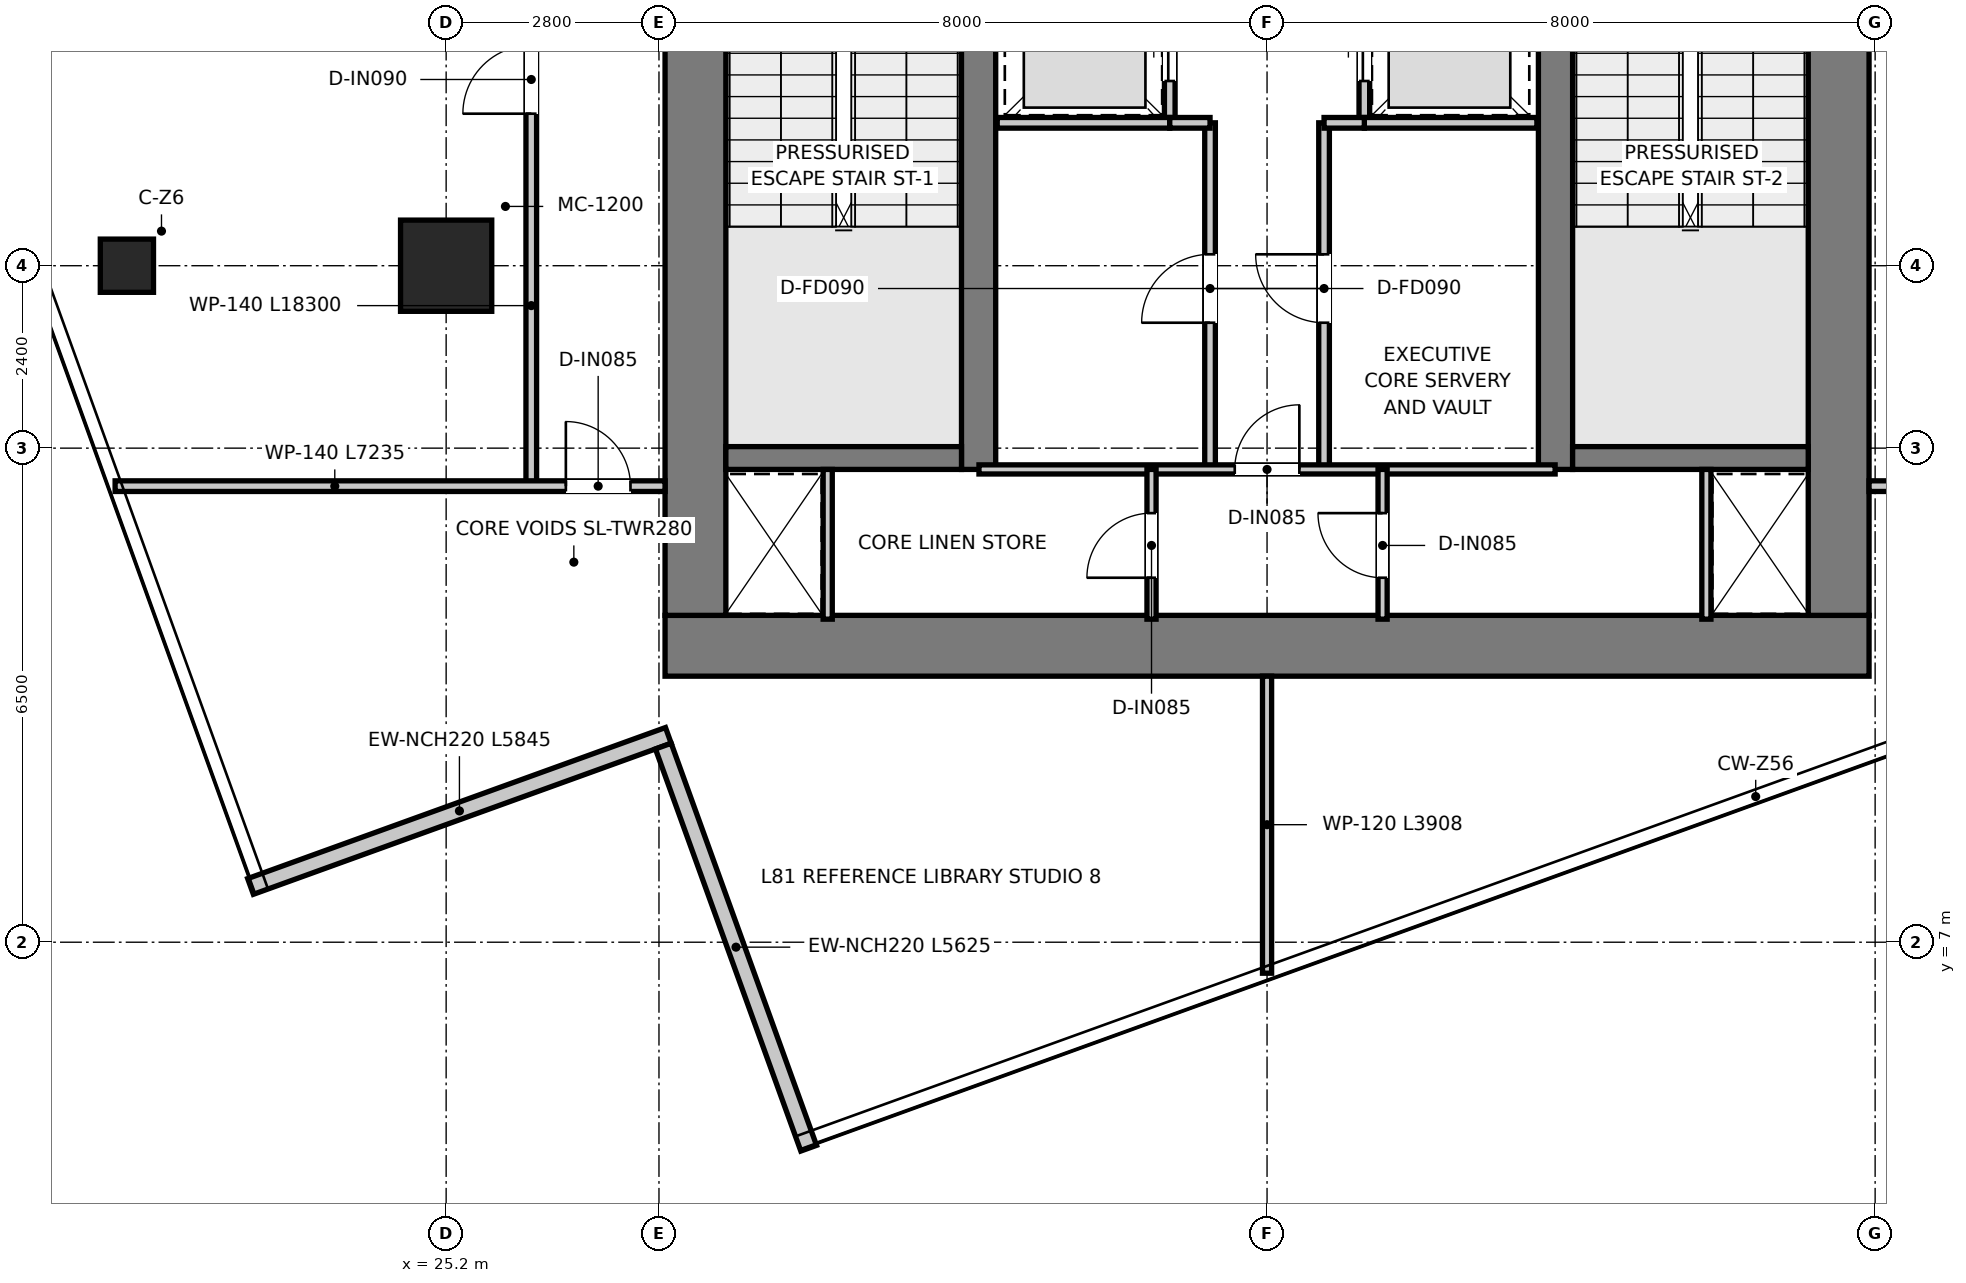
"""IFC4 building model, lengths in metres.
Left out: names, types, materials, properties, quantities, classifications, styles, units other than length and angle.
Written with IfcOpenShell. Run it as: python <this file> out.ifc"""

import sys

from ifc_helpers import new_model, si_unit, direction, frame, frame_2d, origin, origin_2d, place, context, subcontext, project, spatial, rectangle, extrude, source, transform, mapped, element, fill, save


model = new_model("IFC4")
c1 = context("Model", 3, precision=1e-05, world=origin(), true_north=direction((0.0, 1.0)))
c2 = subcontext(c1, "Body", "Model", "MODEL_VIEW")
j1 = project(units=[si_unit("LENGTHUNIT", "METRE"), si_unit("PLANEANGLEUNIT", "RADIAN")], contexts=[c1])
p1 = place(None, origin())
s1 = spatial("IfcSite", under=j1, at=p1, CompositionType="ELEMENT")
p2 = place(p1, origin())
s2 = spatial("IfcBuilding", under=s1, at=p2, CompositionType="ELEMENT")
p3 = place(p2, frame((0.0, 0.0, 331.65)))
s3 = spatial("IfcBuildingStorey", under=s2, at=p3, CompositionType="ELEMENT", Elevation=331.65)
p4 = place(p3, frame((28.08, 10.9, 0.0), z_axis=(0.0, 0.0, 1.0), x_axis=(1.0, 0.0, 0.0)))
e1 = element("IfcWall", 1, at=p4, inside=s3, PredefinedType="SHEAR", context=c2, shape_type="SweptSolid", body=[
    extrude(rectangle(XDim=15.84, YDim=0.8, at=frame_2d((7.92, 0.0))), origin(), (0.0, 0.0, 1.0), 3.95),
])
for number, where, z_axis, x_axis in (
    (2, (28.48, 11.3, 0.0), (0.0, 0.0, 1.0), (0.0, 1.0, 0.0)),
    (3, (43.52, 11.3, 0.0), (0.0, 0.0, 1.0), (0.0, 1.0, 0.0)),
):
    element("IfcWall", number, at=place(p3, frame(where, z_axis=z_axis, x_axis=x_axis)), inside=s3, PredefinedType="SHEAR", context=c2, shape_type="SweptSolid", body=[
        extrude(rectangle(XDim=14.7, YDim=0.8, at=frame_2d((7.35, 0.0))), origin(), (0.0, 0.0, 1.0), 3.95),
    ])
p5 = place(p3, frame((32.205, 13.22, 0.0), z_axis=(0.0, 0.0, 1.0), x_axis=(0.0, 1.0, 0.0)))
e4 = element("IfcWall", 4, at=p5, inside=s3, PredefinedType="SHEAR", context=c2, shape_type="SweptSolid", body=[
    extrude(rectangle(XDim=12.78, YDim=0.45, at=frame_2d((6.39, 0.0))), origin(), (0.0, 0.0, 1.0), 3.95),
])
p6 = place(p5, frame((10.58, 0.0, 0.0)))
e5 = element("IfcOpeningElement", 5, at=p6, cuts=e4, PredefinedType="OPENING", context=c2, shape_type="SweptSolid", body=[
    extrude(rectangle(XDim=1.1, YDim=2.15, at=frame_2d((0.55, 1.075))), frame((0.0, 0.235, 0.0), z_axis=(0.0, -1.0, 0.0), x_axis=(1.0, 0.0, 0.0)), (0.0, 0.0, 1.0), 0.47),
])
p7 = place(p3, frame((39.795, 13.22, 0.0), z_axis=(0.0, 0.0, 1.0), x_axis=(0.0, 1.0, 0.0)))
e6 = element("IfcWall", 6, at=p7, inside=s3, PredefinedType="SHEAR", context=c2, shape_type="SweptSolid", body=[
    extrude(rectangle(XDim=12.78, YDim=0.45, at=frame_2d((6.39, 0.0))), origin(), (0.0, 0.0, 1.0), 3.95),
])
p8 = place(p7, frame((10.58, 0.0, 0.0)))
e7 = element("IfcOpeningElement", 7, at=p8, cuts=e6, PredefinedType="OPENING", context=c2, shape_type="SweptSolid", body=[
    extrude(rectangle(XDim=1.1, YDim=2.15, at=frame_2d((0.55, 1.075))), frame((0.0, 0.235, 0.0), z_axis=(0.0, -1.0, 0.0), x_axis=(1.0, 0.0, 0.0)), (0.0, 0.0, 1.0), 0.47),
])
for number, where, z_axis, x_axis in (
    (8, (28.88, 13.37, 0.0), (0.0, 0.0, 1.0), (1.0, 0.0, 0.0)),
    (9, (40.02, 13.37, 0.0), (0.0, 0.0, 1.0), (1.0, 0.0, 0.0)),
):
    element("IfcWall", number, at=place(p3, frame(where, z_axis=z_axis, x_axis=x_axis)), inside=s3, PredefinedType="SHEAR", context=c2, shape_type="SweptSolid", body=[
        extrude(rectangle(XDim=3.1, YDim=0.3, at=frame_2d((1.55, 0.0))), origin(), (0.0, 0.0, 1.0), 3.95),
    ])
m1 = source(origin(), c2, "Body", "SweptSolid", [
    extrude(rectangle(XDim=1.2, YDim=1.2, at=origin_2d()), origin(), (0.0, 0.0, 1.0), 3.95),
])
p9 = place(p3, frame((25.2, 15.9, 0.0), z_axis=(0.0, 0.0, 1.0), x_axis=(1.0, 0.0, 0.0)))
e10 = element("IfcColumn", 10, at=p9, inside=s3, PredefinedType="USERDEFINED", context=c2, shape_type="MappedRepresentation", body=[
    mapped(m1, transform((0.0, 0.0, 0.0), x_axis=(1.0, 0.0, 0.0), y_axis=(0.0, 1.0, 0.0), z_axis=(0.0, 0.0, 1.0), scale=1.0)),
])
m2 = source(origin(), c2, "Body", "SweptSolid", [
    extrude(rectangle(XDim=0.7, YDim=0.7, at=origin_2d()), origin(), (0.0, 0.0, 1.0), 3.95),
])
p10 = place(p3, frame((21.0, 15.9, 0.0), z_axis=(0.0, 0.0, 1.0), x_axis=(1.0, 0.0, 0.0)))
e11 = element("IfcColumn", 11, at=p10, inside=s3, PredefinedType="COLUMN", context=c2, shape_type="MappedRepresentation", body=[
    mapped(m2, transform((0.0, 0.0, 0.0), x_axis=(1.0, 0.0, 0.0), y_axis=(0.0, 1.0, 0.0), z_axis=(0.0, 0.0, 1.0), scale=1.0)),
])
p11 = place(p3, frame((22.626, 7.734, 0.0), z_axis=(0.0, 0.0, 1.0), x_axis=(0.940439315222, 0.339961607222, 0.0)))
e12 = element("IfcWall", 12, at=p11, inside=s3, PredefinedType="ELEMENTEDWALL", context=c2, shape_type="SweptSolid", body=[
    extrude(rectangle(XDim=5.845, YDim=0.22, at=frame_2d((2.922, 0.0))), origin(), (0.0, 0.0, 1.0), 3.67),
])
p12 = place(p3, frame((28.057, 9.58, 0.0), z_axis=(0.0, 0.0, 1.0), x_axis=(0.339968670636, -0.940436761822, 0.0)))
e13 = element("IfcWall", 13, at=p12, inside=s3, PredefinedType="ELEMENTEDWALL", context=c2, shape_type="SweptSolid", body=[
    extrude(rectangle(XDim=5.625, YDim=0.22, at=frame_2d((2.812, 0.0))), origin(), (0.0, 0.0, 1.0), 3.67),
])
p13 = place(p3, frame((34.72, 17.78, 0.0), z_axis=(0.0, 0.0, 1.0), x_axis=(0.0, 1.0, 0.0)))
e14 = element("IfcWall", 14, at=p13, inside=s3, PredefinedType="PARTITIONING", context=c2, shape_type="SweptSolid", body=[
    extrude(rectangle(XDim=2.42, YDim=0.14, at=frame_2d((1.21, 0.0))), origin(), (0.0, 0.0, 1.0), 3.67),
])
p14 = place(p13, frame((0.55, 0.0, 0.0)))
e15 = element("IfcOpeningElement", 15, at=p14, cuts=e14, PredefinedType="OPENING", context=c2, shape_type="SweptSolid", body=[
    extrude(rectangle(XDim=1.1, YDim=2.15, at=frame_2d((0.55, 1.075))), frame((0.0, 0.08, 0.0), z_axis=(0.0, -1.0, 0.0), x_axis=(1.0, 0.0, 0.0)), (0.0, 0.0, 1.0), 0.16),
])
p15 = place(p3, frame((37.28, 17.78, 0.0), z_axis=(0.0, 0.0, 1.0), x_axis=(0.0, 1.0, 0.0)))
e16 = element("IfcWall", 16, at=p15, inside=s3, PredefinedType="PARTITIONING", context=c2, shape_type="SweptSolid", body=[
    extrude(rectangle(XDim=2.42, YDim=0.14, at=frame_2d((1.21, 0.0))), origin(), (0.0, 0.0, 1.0), 3.67),
])
p16 = place(p15, frame((0.55, 0.0, 0.0)))
e17 = element("IfcOpeningElement", 17, at=p16, cuts=e16, PredefinedType="OPENING", context=c2, shape_type="SweptSolid", body=[
    extrude(rectangle(XDim=1.1, YDim=2.15, at=frame_2d((0.55, 1.075))), frame((0.0, 0.08, 0.0), z_axis=(0.0, -1.0, 0.0), x_axis=(1.0, 0.0, 0.0)), (0.0, 0.0, 1.0), 0.16),
])
for number, where, z_axis, x_axis in (
    (18, (32.45, 17.78, 0.0), (0.0, 0.0, 1.0), (1.0, 0.0, 0.0)),
    (19, (37.28, 17.78, 0.0), (0.0, 0.0, 1.0), (1.0, 0.0, 0.0)),
):
    element("IfcWall", number, at=place(p3, frame(where, z_axis=z_axis, x_axis=x_axis)), inside=s3, PredefinedType="PARTITIONING", context=c2, shape_type="SweptSolid", body=[
        extrude(rectangle(XDim=2.27, YDim=0.14, at=frame_2d((1.135, 0.0))), origin(), (0.0, 0.0, 1.0), 3.67),
    ])
p17 = place(p3, frame((35.25, 13.22, 0.0), z_axis=(0.0, 0.0, 1.0), x_axis=(0.0, 1.0, 0.0)))
e20 = element("IfcWall", 20, at=p17, inside=s3, PredefinedType="PARTITIONING", context=c2, shape_type="SweptSolid", body=[
    extrude(rectangle(XDim=4.56, YDim=0.14, at=frame_2d((2.28, 0.0))), origin(), (0.0, 0.0, 1.0), 3.67),
])
p18 = place(p17, frame((1.93, 0.0, 0.0)))
e21 = element("IfcOpeningElement", 21, at=p18, cuts=e20, PredefinedType="OPENING", context=c2, shape_type="SweptSolid", body=[
    extrude(rectangle(XDim=0.9, YDim=2.1, at=frame_2d((0.45, 1.05))), frame((0.0, 0.08, 0.0), z_axis=(0.0, -1.0, 0.0), x_axis=(1.0, 0.0, 0.0)), (0.0, 0.0, 1.0), 0.16),
])
p19 = place(p3, frame((34.72, 17.78, 0.0), z_axis=(0.0, 0.0, 1.0), x_axis=(1.0, 0.0, 0.0)))
e22 = element("IfcWall", 22, at=p19, inside=s3, PredefinedType="PARTITIONING", context=c2, shape_type="SweptSolid", body=[
    extrude(rectangle(XDim=0.53, YDim=0.14, at=frame_2d((0.265, 0.0))), origin(), (0.0, 0.0, 1.0), 3.67),
])
p20 = place(p3, frame((36.75, 13.22, 0.0), z_axis=(0.0, 0.0, 1.0), x_axis=(0.0, 1.0, 0.0)))
e23 = element("IfcWall", 23, at=p20, inside=s3, PredefinedType="PARTITIONING", context=c2, shape_type="SweptSolid", body=[
    extrude(rectangle(XDim=4.56, YDim=0.14, at=frame_2d((2.28, 0.0))), origin(), (0.0, 0.0, 1.0), 3.67),
])
p21 = place(p20, frame((1.93, 0.0, 0.0)))
e24 = element("IfcOpeningElement", 24, at=p21, cuts=e23, PredefinedType="OPENING", context=c2, shape_type="SweptSolid", body=[
    extrude(rectangle(XDim=0.9, YDim=2.1, at=frame_2d((0.45, 1.05))), frame((0.0, 0.08, 0.0), z_axis=(0.0, -1.0, 0.0), x_axis=(1.0, 0.0, 0.0)), (0.0, 0.0, 1.0), 0.16),
])
p22 = place(p3, frame((36.75, 17.78, 0.0), z_axis=(0.0, 0.0, 1.0), x_axis=(1.0, 0.0, 0.0)))
e25 = element("IfcWall", 25, at=p22, inside=s3, PredefinedType="PARTITIONING", context=c2, shape_type="SweptSolid", body=[
    extrude(rectangle(XDim=0.53, YDim=0.14, at=frame_2d((0.265, 0.0))), origin(), (0.0, 0.0, 1.0), 3.67),
])
for number, where, z_axis, x_axis in (
    (26, (30.22, 11.25, 0.0), (0.0, 0.0, 1.0), (0.0, 1.0, 0.0)),
    (27, (41.78, 11.25, 0.0), (0.0, 0.0, 1.0), (0.0, 1.0, 0.0)),
):
    element("IfcWall", number, at=place(p3, frame(where, z_axis=z_axis, x_axis=x_axis)), inside=s3, PredefinedType="PARTITIONING", context=c2, shape_type="SweptSolid", body=[
        extrude(rectangle(XDim=1.97, YDim=0.12, at=frame_2d((0.985, 0.0))), origin(), (0.0, 0.0, 1.0), 3.67),
    ])
p23 = place(p3, frame((32.21, 13.22, 0.0), z_axis=(0.0, 0.0, 1.0), x_axis=(1.0, 0.0, 0.0)))
e28 = element("IfcWall", 28, at=p23, inside=s3, PredefinedType="PARTITIONING", context=c2, shape_type="SweptSolid", body=[
    extrude(rectangle(XDim=7.58, YDim=0.12, at=frame_2d((3.79, 0.0))), origin(), (0.0, 0.0, 1.0), 3.67),
])
p24 = place(p23, frame((3.365, 0.0, 0.0)))
e29 = element("IfcOpeningElement", 29, at=p24, cuts=e28, PredefinedType="OPENING", context=c2, shape_type="SweptSolid", body=[
    extrude(rectangle(XDim=0.85, YDim=2.1, at=frame_2d((0.425, 1.05))), frame((0.0, 0.07, 0.0), z_axis=(0.0, -1.0, 0.0), x_axis=(1.0, 0.0, 0.0)), (0.0, 0.0, 1.0), 0.14),
])
p25 = place(p3, frame((34.48, 11.25, 0.0), z_axis=(0.0, 0.0, 1.0), x_axis=(0.0, 1.0, 0.0)))
e30 = element("IfcWall", 30, at=p25, inside=s3, PredefinedType="PARTITIONING", context=c2, shape_type="SweptSolid", body=[
    extrude(rectangle(XDim=1.97, YDim=0.12, at=frame_2d((0.985, 0.0))), origin(), (0.0, 0.0, 1.0), 3.67),
])
p26 = place(p25, frame((0.545, 0.0, 0.0)))
e31 = element("IfcOpeningElement", 31, at=p26, cuts=e30, PredefinedType="OPENING", context=c2, shape_type="SweptSolid", body=[
    extrude(rectangle(XDim=0.85, YDim=2.1, at=frame_2d((0.425, 1.05))), frame((0.0, 0.07, 0.0), z_axis=(0.0, -1.0, 0.0), x_axis=(1.0, 0.0, 0.0)), (0.0, 0.0, 1.0), 0.14),
])
p27 = place(p3, frame((37.52, 11.25, 0.0), z_axis=(0.0, 0.0, 1.0), x_axis=(0.0, 1.0, 0.0)))
e32 = element("IfcWall", 32, at=p27, inside=s3, PredefinedType="PARTITIONING", context=c2, shape_type="SweptSolid", body=[
    extrude(rectangle(XDim=1.97, YDim=0.12, at=frame_2d((0.985, 0.0))), origin(), (0.0, 0.0, 1.0), 3.67),
])
p28 = place(p27, frame((0.545, 0.0, 0.0)))
e33 = element("IfcOpeningElement", 33, at=p28, cuts=e32, PredefinedType="OPENING", context=c2, shape_type="SweptSolid", body=[
    extrude(rectangle(XDim=0.85, YDim=2.1, at=frame_2d((0.425, 1.05))), frame((0.0, 0.07, 0.0), z_axis=(0.0, -1.0, 0.0), x_axis=(1.0, 0.0, 0.0)), (0.0, 0.0, 1.0), 0.14),
])
p29 = place(p3, frame((26.32, 13.0, 0.0), z_axis=(0.0, 0.0, 1.0), x_axis=(0.0, 1.0, 0.0)))
e34 = element("IfcWall", 34, at=p29, inside=s3, PredefinedType="PARTITIONING", context=c2, shape_type="SweptSolid", body=[
    extrude(rectangle(XDim=15.66, YDim=0.14, at=frame_2d((7.83, 0.0))), origin(), (0.0, 0.0, 1.0), 3.13),
])
p30 = place(p29, frame((14.3, 0.0, 0.0)))
e35 = element("IfcOpeningElement", 35, at=p30, cuts=e34, PredefinedType="OPENING", context=c2, shape_type="SweptSolid", body=[
    extrude(rectangle(XDim=0.9, YDim=2.1, at=frame_2d((0.45, 1.05))), frame((0.0, 0.08, 0.0), z_axis=(0.0, -1.0, 0.0), x_axis=(1.0, 0.0, 0.0)), (0.0, 0.0, 1.0), 0.16),
])
p31 = place(p29, frame((4.9, 0.0, 0.0)))
e36 = element("IfcOpeningElement", 36, at=p31, cuts=e34, PredefinedType="OPENING", context=c2, shape_type="SweptSolid", body=[
    extrude(rectangle(XDim=0.9, YDim=2.1, at=frame_2d((0.45, 1.05))), frame((0.0, 0.08, 0.0), z_axis=(0.0, -1.0, 0.0), x_axis=(1.0, 0.0, 0.0)), (0.0, 0.0, 1.0), 0.16),
])
p32 = place(p29, frame((8.25, 0.0, 0.0)))
e37 = element("IfcOpeningElement", 37, at=p32, cuts=e34, PredefinedType="OPENING", context=c2, shape_type="SweptSolid", body=[
    extrude(rectangle(XDim=0.9, YDim=2.1, at=frame_2d((0.45, 1.05))), frame((0.0, 0.08, 0.0), z_axis=(0.0, -1.0, 0.0), x_axis=(1.0, 0.0, 0.0)), (0.0, 0.0, 1.0), 0.16),
])
p33 = place(p29, frame((12.06, 0.0, 0.0)))
e38 = element("IfcOpeningElement", 38, at=p33, cuts=e34, PredefinedType="OPENING", context=c2, shape_type="SweptSolid", body=[
    extrude(rectangle(XDim=0.9, YDim=2.1, at=frame_2d((0.45, 1.05))), frame((0.0, 0.08, 0.0), z_axis=(0.0, -1.0, 0.0), x_axis=(1.0, 0.0, 0.0)), (0.0, 0.0, 1.0), 0.16),
])
p34 = place(p3, frame((20.845, 13.0, 0.0), z_axis=(0.0, 0.0, 1.0), x_axis=(1.0, 0.0, 0.0)))
e39 = element("IfcWall", 39, at=p34, inside=s3, PredefinedType="PARTITIONING", context=c2, shape_type="SweptSolid", body=[
    extrude(rectangle(XDim=7.235, YDim=0.14, at=frame_2d((3.618, 0.0))), origin(), (0.0, 0.0, 1.0), 3.18),
])
p35 = place(p34, frame((5.93, 0.0, 0.0)))
e40 = element("IfcOpeningElement", 40, at=p35, cuts=e39, PredefinedType="OPENING", context=c2, shape_type="SweptSolid", body=[
    extrude(rectangle(XDim=0.85, YDim=2.1, at=frame_2d((0.425, 1.05))), frame((0.0, 0.08, 0.0), z_axis=(0.0, -1.0, 0.0), x_axis=(1.0, 0.0, 0.0)), (0.0, 0.0, 1.0), 0.16),
])
p36 = place(p3, frame((43.92, 13.0, 0.0), z_axis=(0.0, 0.0, 1.0), x_axis=(1.0, 0.0, 0.0)))
e41 = element("IfcWall", 41, at=p36, inside=s3, PredefinedType="PARTITIONING", context=c2, shape_type="SweptSolid", body=[
    extrude(rectangle(XDim=9.805, YDim=0.14, at=frame_2d((4.903, 0.0))), origin(), (0.0, 0.0, 1.0), 3.18),
])
p37 = place(p36, frame((0.455, 0.0, 0.0)))
e42 = element("IfcOpeningElement", 42, at=p37, cuts=e41, PredefinedType="OPENING", context=c2, shape_type="SweptSolid", body=[
    extrude(rectangle(XDim=0.85, YDim=2.1, at=frame_2d((0.425, 1.05))), frame((0.0, 0.08, 0.0), z_axis=(0.0, -1.0, 0.0), x_axis=(1.0, 0.0, 0.0)), (0.0, 0.0, 1.0), 0.16),
])
p38 = place(p3, frame((36.0, 6.592, 0.0), z_axis=(0.0, 0.0, 1.0), x_axis=(0.0, 1.0, 0.0)))
e43 = element("IfcWall", 43, at=p38, inside=s3, PredefinedType="PARTITIONING", context=c2, shape_type="SweptSolid", body=[
    extrude(rectangle(XDim=3.908, YDim=0.12, at=frame_2d((1.954, 0.0))), origin(), (0.0, 0.0, 1.0), 3.67),
])
p39 = place(p14, origin())
e44 = element("IfcDoor", 44, at=p39, inside=s3, OperationType="DOUBLE_DOOR_SLIDING", PredefinedType="DOOR", context=c2, shape_type="SweptSolid", body=[
    extrude(rectangle(XDim=1.1, YDim=2.15, at=frame_2d((0.55, 1.075))), frame((0.0, 0.025, 0.0), z_axis=(0.0, -1.0, 0.0), x_axis=(1.0, 0.0, 0.0)), (0.0, 0.0, 1.0), 0.05),
])
fill(e15, e44)
p40 = place(p16, origin())
e45 = element("IfcDoor", 45, at=p40, inside=s3, OperationType="DOUBLE_DOOR_SLIDING", PredefinedType="DOOR", context=c2, shape_type="SweptSolid", body=[
    extrude(rectangle(XDim=1.1, YDim=2.15, at=frame_2d((0.55, 1.075))), frame((0.0, 0.025, 0.0), z_axis=(0.0, -1.0, 0.0), x_axis=(1.0, 0.0, 0.0)), (0.0, 0.0, 1.0), 0.05),
])
fill(e17, e45)
p41 = place(p18, origin())
e46 = element("IfcDoor", 46, at=p41, inside=s3, OperationType="SINGLE_SWING_LEFT", PredefinedType="DOOR", context=c2, shape_type="SweptSolid", body=[
    extrude(rectangle(XDim=0.9, YDim=2.1, at=frame_2d((0.45, 1.05))), frame((0.0, 0.025, 0.0), z_axis=(0.0, -1.0, 0.0), x_axis=(1.0, 0.0, 0.0)), (0.0, 0.0, 1.0), 0.05),
])
fill(e21, e46)
p42 = place(p21, origin())
e47 = element("IfcDoor", 47, at=p42, inside=s3, OperationType="SINGLE_SWING_RIGHT", PredefinedType="DOOR", context=c2, shape_type="SweptSolid", body=[
    extrude(rectangle(XDim=0.9, YDim=2.1, at=frame_2d((0.45, 1.05))), frame((0.0, 0.025, 0.0), z_axis=(0.0, -1.0, 0.0), x_axis=(1.0, 0.0, 0.0)), (0.0, 0.0, 1.0), 0.05),
])
fill(e24, e47)
p43 = place(p24, origin())
e48 = element("IfcDoor", 48, at=p43, inside=s3, OperationType="SINGLE_SWING_RIGHT", PredefinedType="DOOR", context=c2, shape_type="SweptSolid", body=[
    extrude(rectangle(XDim=0.85, YDim=2.1, at=frame_2d((0.425, 1.05))), frame((0.0, 0.025, 0.0), z_axis=(0.0, -1.0, 0.0), x_axis=(1.0, 0.0, 0.0)), (0.0, 0.0, 1.0), 0.05),
])
fill(e29, e48)
p44 = place(p26, origin())
e49 = element("IfcDoor", 49, at=p44, inside=s3, OperationType="SINGLE_SWING_LEFT", PredefinedType="DOOR", context=c2, shape_type="SweptSolid", body=[
    extrude(rectangle(XDim=0.85, YDim=2.1, at=frame_2d((0.425, 1.05))), frame((0.0, 0.025, 0.0), z_axis=(0.0, -1.0, 0.0), x_axis=(1.0, 0.0, 0.0)), (0.0, 0.0, 1.0), 0.05),
])
fill(e31, e49)
p45 = place(p28, origin())
e50 = element("IfcDoor", 50, at=p45, inside=s3, OperationType="SINGLE_SWING_RIGHT", PredefinedType="DOOR", context=c2, shape_type="SweptSolid", body=[
    extrude(rectangle(XDim=0.85, YDim=2.1, at=frame_2d((0.425, 1.05))), frame((0.0, 0.025, 0.0), z_axis=(0.0, -1.0, 0.0), x_axis=(1.0, 0.0, 0.0)), (0.0, 0.0, 1.0), 0.05),
])
fill(e33, e50)
p46 = place(p31, origin())
e51 = element("IfcDoor", 51, at=p46, inside=s3, OperationType="SINGLE_SWING_LEFT", PredefinedType="DOOR", context=c2, shape_type="SweptSolid", body=[
    extrude(rectangle(XDim=0.9, YDim=2.1, at=frame_2d((0.45, 1.05))), frame((0.0, 0.025, 0.0), z_axis=(0.0, -1.0, 0.0), x_axis=(1.0, 0.0, 0.0)), (0.0, 0.0, 1.0), 0.05),
])
fill(e36, e51)
p47 = place(p35, origin())
e52 = element("IfcDoor", 52, at=p47, inside=s3, OperationType="SINGLE_SWING_LEFT", PredefinedType="DOOR", context=c2, shape_type="SweptSolid", body=[
    extrude(rectangle(XDim=0.85, YDim=2.1, at=frame_2d((0.425, 1.05))), frame((0.0, 0.025, 0.0), z_axis=(0.0, -1.0, 0.0), x_axis=(1.0, 0.0, 0.0)), (0.0, 0.0, 1.0), 0.05),
])
fill(e40, e52)
save(model, sys.argv[1])
